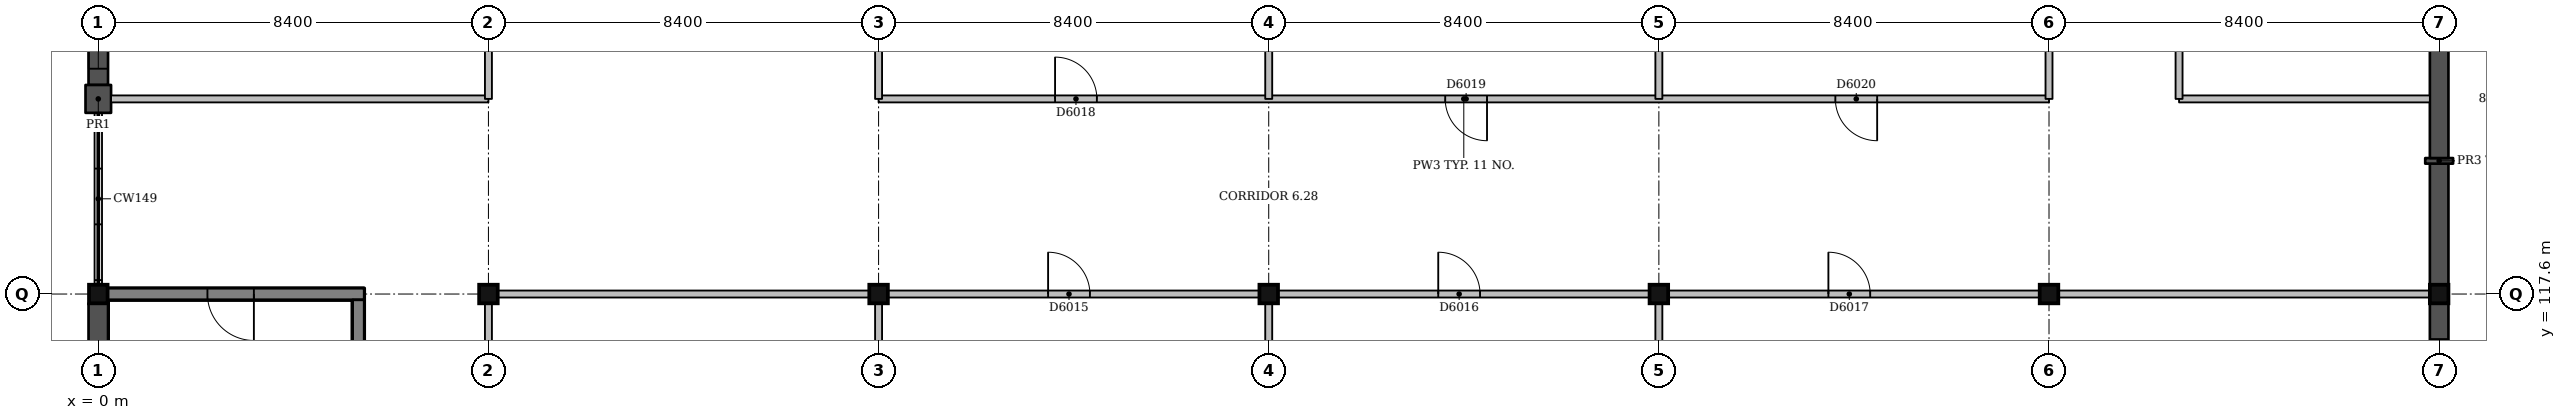
"""IFC4 building model, lengths in metres.
Left out: names, types, materials, properties, quantities, classifications, styles, units other than length and angle.
Written with IfcOpenShell. Run it as: python <this file> out.ifc"""

import sys

from ifc_helpers import new_model, si_unit, direction, frame, frame_2d, origin, origin_2d, place, context, subcontext, project, spatial, rectangle, extrude, element, fill, save


model = new_model("IFC4")
c1 = context("Model", 3, precision=1e-05, world=origin(), true_north=direction((0.0, 1.0)))
c2 = subcontext(c1, "Body", "Model", "MODEL_VIEW")
j1 = project(units=[si_unit("LENGTHUNIT", "METRE"), si_unit("PLANEANGLEUNIT", "RADIAN")], contexts=[c1])
p1 = place(None, origin())
s1 = spatial("IfcSite", under=j1, at=p1, CompositionType="ELEMENT")
p2 = place(p1, origin())
s2 = spatial("IfcBuilding", under=s1, at=p2, CompositionType="ELEMENT")
p3 = place(p2, frame((0.0, 0.0, 27.0)))
s3 = spatial("IfcBuildingStorey", under=s2, at=p3, CompositionType="ELEMENT", Elevation=27.0)
for number, where, z_axis, x_axis in (
    (1, (0.0, 117.6, 0.0), (0.0, 0.0, 1.0), (1.0, 0.0, 0.0)),
    (2, (8.4, 117.6, 0.0), (0.0, 0.0, 1.0), (1.0, 0.0, 0.0)),
    (3, (16.8, 117.6, 0.0), (0.0, 0.0, 1.0), (1.0, 0.0, 0.0)),
    (4, (25.2, 117.6, 0.0), (0.0, 0.0, 1.0), (1.0, 0.0, 0.0)),
    (5, (33.6, 117.6, 0.0), (0.0, 0.0, 1.0), (1.0, 0.0, 0.0)),
    (6, (42.0, 117.6, 0.0), (0.0, 0.0, 1.0), (1.0, 0.0, 0.0)),
    (7, (50.4, 117.6, 0.0), (0.0, 0.0, 1.0), (1.0, 0.0, 0.0)),
):
    element("IfcColumn", number, at=place(p3, frame(where, z_axis=z_axis, x_axis=x_axis)), inside=s3, PredefinedType="COLUMN", context=c2, shape_type="SweptSolid", body=[
        extrude(rectangle(XDim=0.4, YDim=0.4, at=origin_2d()), origin(), (0.0, 0.0, 1.0), 4.5),
    ])
p4 = place(p3, frame((0.2, 117.6, 0.0), z_axis=(0.0, 0.0, 1.0), x_axis=(1.0, 0.0, 0.0)))
e8 = element("IfcWall", 8, at=p4, inside=s3, PredefinedType="SHEAR", context=c2, shape_type="SweptSolid", body=[
    extrude(rectangle(XDim=5.525, YDim=0.25, at=frame_2d((2.763, 0.0))), origin(), (0.0, 0.0, 1.0), 4.5),
])
p5 = place(p4, frame((2.15, 0.0, 0.0)))
e9 = element("IfcOpeningElement", 9, at=p5, cuts=e8, PredefinedType="OPENING", context=c2, shape_type="SweptSolid", body=[
    extrude(rectangle(XDim=1.0, YDim=2.1, at=frame_2d((0.5, 1.05))), frame((0.0, 0.135, 0.0), z_axis=(0.0, -1.0, 0.0), x_axis=(1.0, 0.0, 0.0)), (0.0, 0.0, 1.0), 0.27),
])
p6 = place(p3, frame((5.6, 113.41, 0.0), z_axis=(0.0, 0.0, 1.0), x_axis=(0.0, 1.0, 0.0)))
e10 = element("IfcWall", 10, at=p6, inside=s3, PredefinedType="SHEAR", context=c2, shape_type="SweptSolid", body=[
    extrude(rectangle(XDim=4.065, YDim=0.25, at=frame_2d((2.033, 0.0))), origin(), (0.0, 0.0, 1.0), 4.5),
])
p7 = place(p3, frame((50.4, 113.46, 0.0), z_axis=(0.0, 0.0, 1.0), x_axis=(0.0, 1.0, 0.0)))
e11 = element("IfcWall", 11, at=p7, inside=s3, PredefinedType="SOLIDWALL", context=c2, shape_type="SweptSolid", body=[
    extrude(rectangle(XDim=3.94, YDim=0.4, at=frame_2d((1.97, 0.0))), origin(), (0.0, 0.0, 1.0), 3.6),
])
p8 = place(p7, frame((0.77, 0.0, 0.6)))
e12 = element("IfcOpeningElement", 12, at=p8, cuts=e11, PredefinedType="OPENING", context=c2, shape_type="SweptSolid", body=[
    extrude(rectangle(XDim=2.4, YDim=2.4, at=frame_2d((1.2, 1.2))), frame((0.0, 0.21, 0.0), z_axis=(0.0, -1.0, 0.0), x_axis=(1.0, 0.0, 0.0)), (0.0, 0.0, 1.0), 0.42),
])
p9 = place(p3, frame((50.4, 117.8, 0.0), z_axis=(0.0, 0.0, 1.0), x_axis=(0.0, 1.0, 0.0)))
e13 = element("IfcWall", 13, at=p9, inside=s3, PredefinedType="SOLIDWALL", context=c2, shape_type="SweptSolid", body=[
    extrude(rectangle(XDim=2.607, YDim=0.4, at=frame_2d((1.303, 0.0))), origin(), (0.0, 0.0, 1.0), 3.6),
])
p10 = place(p3, frame((50.4, 120.407, 0.0), z_axis=(0.0, 0.0, 1.0), x_axis=(0.0, 1.0, 0.0)))
e14 = element("IfcWall", 14, at=p10, inside=s3, PredefinedType="SOLIDWALL", context=c2, shape_type="SweptSolid", body=[
    extrude(rectangle(XDim=0.12, YDim=0.6, at=frame_2d((0.06, 0.0))), origin(), (0.0, 0.0, 1.0), 3.6),
])
p11 = place(p3, frame((50.4, 120.527, 0.0), z_axis=(0.0, 0.0, 1.0), x_axis=(0.0, 1.0, 0.0)))
e15 = element("IfcWall", 15, at=p11, inside=s3, PredefinedType="SOLIDWALL", context=c2, shape_type="SweptSolid", body=[
    extrude(rectangle(XDim=2.547, YDim=0.4, at=frame_2d((1.273, 0.0))), origin(), (0.0, 0.0, 1.0), 3.6),
])
p12 = place(p3, frame((0.0, 125.8, 0.0), z_axis=(0.0, 0.0, 1.0), x_axis=(0.0, -1.0, 0.0)))
e16 = element("IfcWall", 16, at=p12, inside=s3, PredefinedType="SOLIDWALL", context=c2, shape_type="SweptSolid", body=[
    extrude(rectangle(XDim=3.7, YDim=0.42, at=frame_2d((1.85, 0.0))), origin(), (0.0, 0.0, 1.0), 3.35),
])
p13 = place(p12, frame((0.35, 0.0, 1.0)))
e17 = element("IfcOpeningElement", 17, at=p13, cuts=e16, PredefinedType="OPENING", context=c2, shape_type="SweptSolid", body=[
    extrude(rectangle(XDim=0.6, YDim=1.8, at=frame_2d((0.3, 0.9))), frame((0.0, 0.22, 0.0), z_axis=(0.0, -1.0, 0.0), x_axis=(1.0, 0.0, 0.0)), (0.0, 0.0, 1.0), 0.44),
])
p14 = place(p12, frame((1.55, 0.0, 1.0)))
e18 = element("IfcOpeningElement", 18, at=p14, cuts=e16, PredefinedType="OPENING", context=c2, shape_type="SweptSolid", body=[
    extrude(rectangle(XDim=0.6, YDim=1.8, at=frame_2d((0.3, 0.9))), frame((0.0, 0.22, 0.0), z_axis=(0.0, -1.0, 0.0), x_axis=(1.0, 0.0, 0.0)), (0.0, 0.0, 1.0), 0.44),
])
p15 = place(p12, frame((2.75, 0.0, 1.0)))
e19 = element("IfcOpeningElement", 19, at=p15, cuts=e16, PredefinedType="OPENING", context=c2, shape_type="SweptSolid", body=[
    extrude(rectangle(XDim=0.6, YDim=1.8, at=frame_2d((0.3, 0.9))), frame((0.0, 0.22, 0.0), z_axis=(0.0, -1.0, 0.0), x_axis=(1.0, 0.0, 0.0)), (0.0, 0.0, 1.0), 0.44),
])
p16 = place(p3, frame((0.0, 122.1, 0.0), z_axis=(0.0, 0.0, 1.0), x_axis=(0.0, -1.0, 0.0)))
e20 = element("IfcWall", 20, at=p16, inside=s3, PredefinedType="SOLIDWALL", context=c2, shape_type="SweptSolid", body=[
    extrude(rectangle(XDim=0.6, YDim=0.55, at=frame_2d((0.3, 0.0))), origin(), (0.0, 0.0, 1.0), 3.35),
])
p17 = place(p3, frame((0.0, 117.4, 0.0), z_axis=(0.0, 0.0, 1.0), x_axis=(0.0, -1.0, 0.0)))
e21 = element("IfcWall", 21, at=p17, inside=s3, PredefinedType="SOLIDWALL", context=c2, shape_type="SweptSolid", body=[
    extrude(rectangle(XDim=3.7, YDim=0.42, at=frame_2d((1.85, 0.0))), origin(), (0.0, 0.0, 1.0), 4.5),
])
p18 = place(p3, frame((8.6, 117.6, 0.0), z_axis=(0.0, 0.0, 1.0), x_axis=(1.0, 0.0, 0.0)))
e22 = element("IfcWall", 22, at=p18, inside=s3, PredefinedType="PARTITIONING", context=c2, shape_type="SweptSolid", body=[
    extrude(rectangle(XDim=8.0, YDim=0.15, at=frame_2d((4.0, 0.0))), origin(), (0.0, 0.0, 1.0), 3.4),
])
p19 = place(p3, frame((17.0, 117.6, 0.0), z_axis=(0.0, 0.0, 1.0), x_axis=(1.0, 0.0, 0.0)))
e23 = element("IfcWall", 23, at=p19, inside=s3, PredefinedType="PARTITIONING", context=c2, shape_type="SweptSolid", body=[
    extrude(rectangle(XDim=8.0, YDim=0.15, at=frame_2d((4.0, 0.0))), origin(), (0.0, 0.0, 1.0), 3.4),
])
p20 = place(p19, frame((3.45, 0.0, 0.0)))
e24 = element("IfcOpeningElement", 24, at=p20, cuts=e23, PredefinedType="OPENING", context=c2, shape_type="SweptSolid", body=[
    extrude(rectangle(XDim=0.9, YDim=2.1, at=frame_2d((0.45, 1.05))), frame((0.0, 0.085, 0.0), z_axis=(0.0, -1.0, 0.0), x_axis=(1.0, 0.0, 0.0)), (0.0, 0.0, 1.0), 0.17),
])
p21 = place(p3, frame((25.4, 117.6, 0.0), z_axis=(0.0, 0.0, 1.0), x_axis=(1.0, 0.0, 0.0)))
e25 = element("IfcWall", 25, at=p21, inside=s3, PredefinedType="PARTITIONING", context=c2, shape_type="SweptSolid", body=[
    extrude(rectangle(XDim=8.0, YDim=0.15, at=frame_2d((4.0, 0.0))), origin(), (0.0, 0.0, 1.0), 3.4),
])
p22 = place(p21, frame((3.45, 0.0, 0.0)))
e26 = element("IfcOpeningElement", 26, at=p22, cuts=e25, PredefinedType="OPENING", context=c2, shape_type="SweptSolid", body=[
    extrude(rectangle(XDim=0.9, YDim=2.1, at=frame_2d((0.45, 1.05))), frame((0.0, 0.085, 0.0), z_axis=(0.0, -1.0, 0.0), x_axis=(1.0, 0.0, 0.0)), (0.0, 0.0, 1.0), 0.17),
])
p23 = place(p3, frame((33.8, 117.6, 0.0), z_axis=(0.0, 0.0, 1.0), x_axis=(1.0, 0.0, 0.0)))
e27 = element("IfcWall", 27, at=p23, inside=s3, PredefinedType="PARTITIONING", context=c2, shape_type="SweptSolid", body=[
    extrude(rectangle(XDim=8.0, YDim=0.15, at=frame_2d((4.0, 0.0))), origin(), (0.0, 0.0, 1.0), 3.35),
])
p24 = place(p23, frame((3.45, 0.0, 0.0)))
e28 = element("IfcOpeningElement", 28, at=p24, cuts=e27, PredefinedType="OPENING", context=c2, shape_type="SweptSolid", body=[
    extrude(rectangle(XDim=0.9, YDim=2.1, at=frame_2d((0.45, 1.05))), frame((0.0, 0.085, 0.0), z_axis=(0.0, -1.0, 0.0), x_axis=(1.0, 0.0, 0.0)), (0.0, 0.0, 1.0), 0.17),
])
p25 = place(p3, frame((42.2, 117.6, 0.0), z_axis=(0.0, 0.0, 1.0), x_axis=(1.0, 0.0, 0.0)))
e29 = element("IfcWall", 29, at=p25, inside=s3, PredefinedType="PARTITIONING", context=c2, shape_type="SweptSolid", body=[
    extrude(rectangle(XDim=8.0, YDim=0.15, at=frame_2d((4.0, 0.0))), origin(), (0.0, 0.0, 1.0), 3.35),
])
p26 = place(p3, frame((0.275, 121.8, 0.0), z_axis=(0.0, 0.0, 1.0), x_axis=(1.0, 0.0, 0.0)))
e30 = element("IfcWall", 30, at=p26, inside=s3, PredefinedType="PARTITIONING", context=c2, shape_type="SweptSolid", body=[
    extrude(rectangle(XDim=8.125, YDim=0.15, at=frame_2d((4.062, 0.0))), origin(), (0.0, 0.0, 1.0), 3.4),
])
p27 = place(p3, frame((16.8, 121.8, 0.0), z_axis=(0.0, 0.0, 1.0), x_axis=(1.0, 0.0, 0.0)))
e31 = element("IfcWall", 31, at=p27, inside=s3, PredefinedType="PARTITIONING", context=c2, shape_type="SweptSolid", body=[
    extrude(rectangle(XDim=25.2, YDim=0.15, at=frame_2d((12.6, 0.0))), origin(), (0.0, 0.0, 1.0), 3.35),
])
p28 = place(p27, frame((3.8, 0.0, 0.0)))
e32 = element("IfcOpeningElement", 32, at=p28, cuts=e31, PredefinedType="OPENING", context=c2, shape_type="SweptSolid", body=[
    extrude(rectangle(XDim=0.9, YDim=2.1, at=frame_2d((0.45, 1.05))), frame((0.0, 0.085, 0.0), z_axis=(0.0, -1.0, 0.0), x_axis=(1.0, 0.0, 0.0)), (0.0, 0.0, 1.0), 0.17),
])
p29 = place(p27, frame((12.2, 0.0, 0.0)))
e33 = element("IfcOpeningElement", 33, at=p29, cuts=e31, PredefinedType="OPENING", context=c2, shape_type="SweptSolid", body=[
    extrude(rectangle(XDim=0.9, YDim=2.1, at=frame_2d((0.45, 1.05))), frame((0.0, 0.085, 0.0), z_axis=(0.0, -1.0, 0.0), x_axis=(1.0, 0.0, 0.0)), (0.0, 0.0, 1.0), 0.17),
])
p30 = place(p27, frame((20.6, 0.0, 0.0)))
e34 = element("IfcOpeningElement", 34, at=p30, cuts=e31, PredefinedType="OPENING", context=c2, shape_type="SweptSolid", body=[
    extrude(rectangle(XDim=0.9, YDim=2.1, at=frame_2d((0.45, 1.05))), frame((0.0, 0.085, 0.0), z_axis=(0.0, -1.0, 0.0), x_axis=(1.0, 0.0, 0.0)), (0.0, 0.0, 1.0), 0.17),
])
p31 = place(p3, frame((44.8, 121.8, 0.0), z_axis=(0.0, 0.0, 1.0), x_axis=(1.0, 0.0, 0.0)))
e35 = element("IfcWall", 35, at=p31, inside=s3, PredefinedType="PARTITIONING", context=c2, shape_type="SweptSolid", body=[
    extrude(rectangle(XDim=5.4, YDim=0.15, at=frame_2d((2.7, 0.0))), origin(), (0.0, 0.0, 1.0), 4.15),
])
p32 = place(p3, frame((8.4, 113.55, 0.0), z_axis=(0.0, 0.0, 1.0), x_axis=(0.0, 1.0, 0.0)))
e36 = element("IfcWall", 36, at=p32, inside=s3, PredefinedType="PARTITIONING", context=c2, shape_type="SweptSolid", body=[
    extrude(rectangle(XDim=3.85, YDim=0.15, at=frame_2d((1.925, 0.0))), origin(), (0.0, 0.0, 1.0), 3.4),
])
p33 = place(p32, frame((1.35, 0.0, 0.0)))
e37 = element("IfcOpeningElement", 37, at=p33, cuts=e36, PredefinedType="OPENING", context=c2, shape_type="SweptSolid", body=[
    extrude(rectangle(XDim=1.0, YDim=2.1, at=frame_2d((0.5, 1.05))), frame((0.0, 0.085, 0.0), z_axis=(0.0, -1.0, 0.0), x_axis=(1.0, 0.0, 0.0)), (0.0, 0.0, 1.0), 0.17),
])
p34 = place(p3, frame((8.4, 121.8, 0.0), z_axis=(0.0, 0.0, 1.0), x_axis=(0.0, 1.0, 0.0)))
e38 = element("IfcWall", 38, at=p34, inside=s3, PredefinedType="PARTITIONING", context=c2, shape_type="SweptSolid", body=[
    extrude(rectangle(XDim=4.0, YDim=0.15, at=frame_2d((2.0, 0.0))), origin(), (0.0, 0.0, 1.0), 3.4),
])
p35 = place(p34, frame((1.35, 0.0, 0.0)))
e39 = element("IfcOpeningElement", 39, at=p35, cuts=e38, PredefinedType="OPENING", context=c2, shape_type="SweptSolid", body=[
    extrude(rectangle(XDim=1.0, YDim=2.1, at=frame_2d((0.5, 1.05))), frame((0.0, 0.085, 0.0), z_axis=(0.0, -1.0, 0.0), x_axis=(1.0, 0.0, 0.0)), (0.0, 0.0, 1.0), 0.17),
])
p36 = place(p3, frame((16.8, 121.8, 0.0), z_axis=(0.0, 0.0, 1.0), x_axis=(0.0, 1.0, 0.0)))
e40 = element("IfcWall", 40, at=p36, inside=s3, PredefinedType="PARTITIONING", context=c2, shape_type="SweptSolid", body=[
    extrude(rectangle(XDim=4.0, YDim=0.15, at=frame_2d((2.0, 0.0))), origin(), (0.0, 0.0, 1.0), 3.4),
])
for number, where, z_axis, x_axis in (
    (41, (16.8, 109.4, 0.0), (0.0, 0.0, 1.0), (0.0, 1.0, 0.0)),
    (42, (25.2, 109.4, 0.0), (0.0, 0.0, 1.0), (0.0, 1.0, 0.0)),
):
    element("IfcWall", number, at=place(p3, frame(where, z_axis=z_axis, x_axis=x_axis)), inside=s3, PredefinedType="PARTITIONING", context=c2, shape_type="SweptSolid", body=[
        extrude(rectangle(XDim=8.0, YDim=0.15, at=frame_2d((4.0, 0.0))), origin(), (0.0, 0.0, 1.0), 3.35),
    ])
p37 = place(p3, frame((25.2, 121.8, 0.0), z_axis=(0.0, 0.0, 1.0), x_axis=(0.0, 1.0, 0.0)))
e43 = element("IfcWall", 43, at=p37, inside=s3, PredefinedType="PARTITIONING", context=c2, shape_type="SweptSolid", body=[
    extrude(rectangle(XDim=4.0, YDim=0.15, at=frame_2d((2.0, 0.0))), origin(), (0.0, 0.0, 1.0), 3.4),
])
p38 = place(p3, frame((33.6, 109.4, 0.0), z_axis=(0.0, 0.0, 1.0), x_axis=(0.0, 1.0, 0.0)))
e44 = element("IfcWall", 44, at=p38, inside=s3, PredefinedType="PARTITIONING", context=c2, shape_type="SweptSolid", body=[
    extrude(rectangle(XDim=8.0, YDim=0.15, at=frame_2d((4.0, 0.0))), origin(), (0.0, 0.0, 1.0), 3.35),
])
p39 = place(p3, frame((33.6, 121.8, 0.0), z_axis=(0.0, 0.0, 1.0), x_axis=(0.0, 1.0, 0.0)))
e45 = element("IfcWall", 45, at=p39, inside=s3, PredefinedType="PARTITIONING", context=c2, shape_type="SweptSolid", body=[
    extrude(rectangle(XDim=4.0, YDim=0.15, at=frame_2d((2.0, 0.0))), origin(), (0.0, 0.0, 1.0), 3.4),
])
p40 = place(p3, frame((42.0, 121.8, 0.0), z_axis=(0.0, 0.0, 1.0), x_axis=(0.0, 1.0, 0.0)))
e46 = element("IfcWall", 46, at=p40, inside=s3, PredefinedType="PARTITIONING", context=c2, shape_type="SweptSolid", body=[
    extrude(rectangle(XDim=4.0, YDim=0.15, at=frame_2d((2.0, 0.0))), origin(), (0.0, 0.0, 1.0), 3.35),
])
p41 = place(p3, frame((44.8, 121.8, 0.0), z_axis=(0.0, 0.0, 1.0), x_axis=(0.0, 1.0, 0.0)))
e47 = element("IfcWall", 47, at=p41, inside=s3, PredefinedType="PARTITIONING", context=c2, shape_type="SweptSolid", body=[
    extrude(rectangle(XDim=12.6, YDim=0.15, at=frame_2d((6.3, 0.0))), origin(), (0.0, 0.0, 1.0), 2.37),
])
p42 = place(p41, frame((1.7, 0.0, 0.0)))
e48 = element("IfcOpeningElement", 48, at=p42, cuts=e47, PredefinedType="OPENING", context=c2, shape_type="SweptSolid", body=[
    extrude(rectangle(XDim=0.9, YDim=2.1, at=frame_2d((0.45, 1.05))), frame((0.0, 0.085, 0.0), z_axis=(0.0, -1.0, 0.0), x_axis=(1.0, 0.0, 0.0)), (0.0, 0.0, 1.0), 0.17),
])
p43 = place(p41, frame((8.0, 0.0, 0.0)))
e49 = element("IfcOpeningElement", 49, at=p43, cuts=e47, PredefinedType="OPENING", context=c2, shape_type="SweptSolid", body=[
    extrude(rectangle(XDim=0.9, YDim=2.1, at=frame_2d((0.45, 1.05))), frame((0.0, 0.085, 0.0), z_axis=(0.0, -1.0, 0.0), x_axis=(1.0, 0.0, 0.0)), (0.0, 0.0, 1.0), 0.17),
])
p44 = place(p8, origin())
e50 = element("IfcWindow", 50, at=p44, inside=s3, PartitioningType="SINGLE_PANEL", PredefinedType="WINDOW", context=c2, shape_type="SweptSolid", body=[
    extrude(rectangle(XDim=2.4, YDim=2.4, at=frame_2d((1.2, 1.2))), frame((0.0, 0.16, 0.0), z_axis=(0.0, -1.0, 0.0), x_axis=(1.0, 0.0, 0.0)), (0.0, 0.0, 1.0), 0.06),
])
fill(e12, e50)
p45 = place(p15, origin())
e51 = element("IfcWindow", 51, at=p45, inside=s3, PartitioningType="SINGLE_PANEL", PredefinedType="WINDOW", context=c2, shape_type="SweptSolid", body=[
    extrude(rectangle(XDim=0.6, YDim=1.8, at=frame_2d((0.3, 0.9))), frame((0.0, 0.15, 0.0), z_axis=(0.0, -1.0, 0.0), x_axis=(1.0, 0.0, 0.0)), (0.0, 0.0, 1.0), 0.06),
])
fill(e19, e51)
p46 = place(p20, origin())
e52 = element("IfcDoor", 52, at=p46, inside=s3, OperationType="SINGLE_SWING_LEFT", PredefinedType="DOOR", context=c2, shape_type="SweptSolid", body=[
    extrude(rectangle(XDim=0.9, YDim=2.1, at=frame_2d((0.45, 1.05))), frame((0.0, 0.025, 0.0), z_axis=(0.0, -1.0, 0.0), x_axis=(1.0, 0.0, 0.0)), (0.0, 0.0, 1.0), 0.05),
])
fill(e24, e52)
p47 = place(p22, origin())
e53 = element("IfcDoor", 53, at=p47, inside=s3, OperationType="SINGLE_SWING_LEFT", PredefinedType="DOOR", context=c2, shape_type="SweptSolid", body=[
    extrude(rectangle(XDim=0.9, YDim=2.1, at=frame_2d((0.45, 1.05))), frame((0.0, 0.025, 0.0), z_axis=(0.0, -1.0, 0.0), x_axis=(1.0, 0.0, 0.0)), (0.0, 0.0, 1.0), 0.05),
])
fill(e26, e53)
p48 = place(p24, origin())
e54 = element("IfcDoor", 54, at=p48, inside=s3, OperationType="SINGLE_SWING_LEFT", PredefinedType="DOOR", context=c2, shape_type="SweptSolid", body=[
    extrude(rectangle(XDim=0.9, YDim=2.1, at=frame_2d((0.45, 1.05))), frame((0.0, 0.025, 0.0), z_axis=(0.0, -1.0, 0.0), x_axis=(1.0, 0.0, 0.0)), (0.0, 0.0, 1.0), 0.05),
])
fill(e28, e54)
p49 = place(p28, origin())
e55 = element("IfcDoor", 55, at=p49, inside=s3, OperationType="SINGLE_SWING_LEFT", PredefinedType="DOOR", context=c2, shape_type="SweptSolid", body=[
    extrude(rectangle(XDim=0.9, YDim=2.1, at=frame_2d((0.45, 1.05))), frame((0.0, 0.025, 0.0), z_axis=(0.0, -1.0, 0.0), x_axis=(1.0, 0.0, 0.0)), (0.0, 0.0, 1.0), 0.05),
])
fill(e32, e55)
p50 = place(p29, origin())
e56 = element("IfcDoor", 56, at=p50, inside=s3, OperationType="SINGLE_SWING_RIGHT", PredefinedType="DOOR", context=c2, shape_type="SweptSolid", body=[
    extrude(rectangle(XDim=0.9, YDim=2.1, at=frame_2d((0.45, 1.05))), frame((0.0, 0.025, 0.0), z_axis=(0.0, -1.0, 0.0), x_axis=(1.0, 0.0, 0.0)), (0.0, 0.0, 1.0), 0.05),
])
fill(e33, e56)
p51 = place(p30, origin())
e57 = element("IfcDoor", 57, at=p51, inside=s3, OperationType="SINGLE_SWING_RIGHT", PredefinedType="DOOR", context=c2, shape_type="SweptSolid", body=[
    extrude(rectangle(XDim=0.9, YDim=2.1, at=frame_2d((0.45, 1.05))), frame((0.0, 0.025, 0.0), z_axis=(0.0, -1.0, 0.0), x_axis=(1.0, 0.0, 0.0)), (0.0, 0.0, 1.0), 0.05),
])
fill(e34, e57)
p52 = place(p5, origin())
e58 = element("IfcDoor", 58, at=p52, inside=s3, OperationType="SINGLE_SWING_RIGHT", PredefinedType="DOOR", context=c2, shape_type="SweptSolid", body=[
    extrude(rectangle(XDim=1.0, YDim=2.1, at=frame_2d((0.5, 1.05))), frame((0.0, 0.025, 0.0), z_axis=(0.0, -1.0, 0.0), x_axis=(1.0, 0.0, 0.0)), (0.0, 0.0, 1.0), 0.05),
])
fill(e9, e58)
save(model, sys.argv[1])
